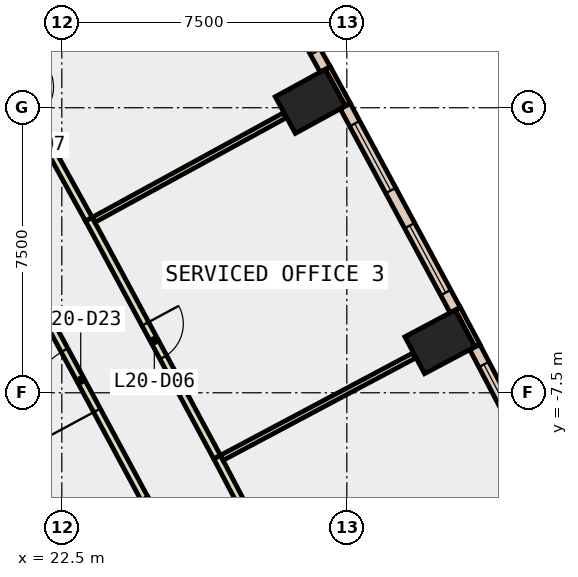
"""IFC4 building model, lengths in metres.
Left out: names, types, materials, properties, quantities, classifications, styles, units other than length and angle.
Written with IfcOpenShell. Run it as: python <this file> out.ifc"""

import sys

from ifc_helpers import new_model, si_unit, direction, frame, frame_2d, origin, origin_2d, place, context, subcontext, project, spatial, rectangle, extrude, element, fill, save


model = new_model("IFC4")
c1 = context("Model", 3, precision=1e-05, world=origin(), true_north=direction((0.0, 1.0)))
c2 = subcontext(c1, "Body", "Model", "MODEL_VIEW")
j1 = project(units=[si_unit("LENGTHUNIT", "METRE"), si_unit("PLANEANGLEUNIT", "RADIAN")], contexts=[c1])
p1 = place(None, origin())
s1 = spatial("IfcSite", under=j1, at=p1, CompositionType="ELEMENT")
p2 = place(p1, origin())
s2 = spatial("IfcBuilding", under=s1, at=p2, CompositionType="ELEMENT")
p3 = place(p2, frame((0.0, 0.0, 95.0)))
s3 = spatial("IfcBuildingStorey", under=s2, at=p3, CompositionType="ELEMENT", Elevation=95.0)
for number, where, z_axis, x_axis in (
    (1, (32.449, -6.16, -0.4), (0.0, 0.0, 1.0), (-0.469, 0.883, 0.0)),
    (2, (29.039, 0.167, -0.4), (0.0, 0.0, 1.0), (-0.48, 0.877, 0.0)),
):
    element("IfcColumn", number, at=place(p3, frame(where, z_axis=z_axis, x_axis=x_axis)), inside=s3, PredefinedType="COLUMN", context=c2, shape_type="SweptSolid", body=[
        extrude(rectangle(XDim=1.1, YDim=1.5, at=origin_2d()), origin(), (0.0, 0.0, 1.0), 4.2),
    ])
p4 = place(p3, frame((33.436, -6.259, 0.0), z_axis=(0.0, 0.0, 1.0), x_axis=(-0.469366248657, 0.883003581319, 0.0)))
e3 = element("IfcWall", 3, at=p4, inside=s3, PredefinedType="STANDARD", context=c2, shape_type="SweptSolid", body=[
    extrude(rectangle(XDim=1.1, YDim=0.15, at=frame_2d((0.55, 0.0))), origin(), (0.0, 0.0, 1.0), 3.8),
])
p5 = place(p3, frame((30.027, 0.08, 0.0), z_axis=(0.0, 0.0, 1.0), x_axis=(-0.479737645119, 0.877411985247, 0.0)))
e4 = element("IfcWall", 4, at=p5, inside=s3, PredefinedType="STANDARD", context=c2, shape_type="SweptSolid", body=[
    extrude(rectangle(XDim=1.101, YDim=0.15, at=frame_2d((0.55, 0.0))), origin(), (0.0, 0.0, 1.0), 3.8),
])
p6 = place(p3, frame((36.186, -11.676, 0.0), z_axis=(0.0, 0.0, 1.0), x_axis=(-0.464187178015, 0.885737130173, 0.0)))
e5 = element("IfcWall", 5, at=p6, inside=s3, PredefinedType="STANDARD", context=c2, shape_type="SweptSolid", body=[
    extrude(rectangle(XDim=6.075, YDim=0.3, at=frame_2d((3.038, 0.0))), origin(), (0.0, 0.0, 1.0), 3.8),
])
p7 = place(p6, frame((0.519, 0.0, 0.9)))
e6 = element("IfcOpeningElement", 6, at=p7, cuts=e5, PredefinedType="OPENING", context=c2, shape_type="SweptSolid", body=[
    extrude(rectangle(XDim=2.0, YDim=2.6, at=frame_2d((1.0, 1.3))), frame((0.0, 0.16, 0.0), z_axis=(0.0, -1.0, 0.0), x_axis=(1.0, 0.0, 0.0)), (0.0, 0.0, 1.0), 0.32),
])
p8 = place(p6, frame((3.556, 0.0, 0.9)))
e7 = element("IfcOpeningElement", 7, at=p8, cuts=e5, PredefinedType="OPENING", context=c2, shape_type="SweptSolid", body=[
    extrude(rectangle(XDim=2.0, YDim=2.6, at=frame_2d((1.0, 1.3))), frame((0.0, 0.16, 0.0), z_axis=(0.0, -1.0, 0.0), x_axis=(1.0, 0.0, 0.0)), (0.0, 0.0, 1.0), 0.32),
])
p9 = place(p3, frame((32.851, -5.325, 0.0), z_axis=(0.0, 0.0, 1.0), x_axis=(-0.474369552216, 0.880325807829, 0.0)))
e8 = element("IfcWall", 8, at=p9, inside=s3, PredefinedType="STANDARD", context=c2, shape_type="SweptSolid", body=[
    extrude(rectangle(XDim=6.099, YDim=0.3, at=frame_2d((3.049, 0.0))), origin(), (0.0, 0.0, 1.0), 3.8),
])
p10 = place(p9, frame((0.525, 0.0, 0.9)))
e9 = element("IfcOpeningElement", 9, at=p10, cuts=e8, PredefinedType="OPENING", context=c2, shape_type="SweptSolid", body=[
    extrude(rectangle(XDim=2.0, YDim=2.6, at=frame_2d((1.0, 1.3))), frame((0.0, 0.16, 0.0), z_axis=(0.0, -1.0, 0.0), x_axis=(1.0, 0.0, 0.0)), (0.0, 0.0, 1.0), 0.32),
])
p11 = place(p9, frame((3.574, 0.0, 0.9)))
e10 = element("IfcOpeningElement", 10, at=p11, cuts=e8, PredefinedType="OPENING", context=c2, shape_type="SweptSolid", body=[
    extrude(rectangle(XDim=2.0, YDim=2.6, at=frame_2d((1.0, 1.3))), frame((0.0, 0.16, 0.0), z_axis=(0.0, -1.0, 0.0), x_axis=(1.0, 0.0, 0.0)), (0.0, 0.0, 1.0), 0.32),
])
p12 = place(p3, frame((29.431, 1.007, 0.0), z_axis=(0.0, 0.0, 1.0), x_axis=(-0.484823579315, 0.874611969356, 0.0)))
e11 = element("IfcWall", 11, at=p12, inside=s3, PredefinedType="STANDARD", context=c2, shape_type="SweptSolid", body=[
    extrude(rectangle(XDim=6.099, YDim=0.3, at=frame_2d((3.049, 0.0))), origin(), (0.0, 0.0, 1.0), 3.8),
])
p13 = place(p12, frame((0.525, 0.0, 0.9)))
e12 = element("IfcOpeningElement", 12, at=p13, cuts=e11, PredefinedType="OPENING", context=c2, shape_type="SweptSolid", body=[
    extrude(rectangle(XDim=2.0, YDim=2.6, at=frame_2d((1.0, 1.3))), frame((0.0, 0.16, 0.0), z_axis=(0.0, -1.0, 0.0), x_axis=(1.0, 0.0, 0.0)), (0.0, 0.0, 1.0), 0.32),
])
p14 = place(p12, frame((3.574, 0.0, 0.9)))
e13 = element("IfcOpeningElement", 13, at=p14, cuts=e11, PredefinedType="OPENING", context=c2, shape_type="SweptSolid", body=[
    extrude(rectangle(XDim=2.0, YDim=2.6, at=frame_2d((1.0, 1.3))), frame((0.0, 0.16, 0.0), z_axis=(0.0, -1.0, 0.0), x_axis=(1.0, 0.0, 0.0)), (0.0, 0.0, 1.0), 0.32),
])
p15 = place(p3, frame((27.461, -15.6, 0.0), z_axis=(0.0, 0.0, 1.0), x_axis=(-0.464203280494, 0.885728691179, 0.0)))
e14 = element("IfcWall", 14, at=p15, inside=s3, PredefinedType="PARTITIONING", context=c2, shape_type="SweptSolid", body=[
    extrude(rectangle(XDim=5.995, YDim=0.2, at=frame_2d((2.998, 0.0))), origin(), (0.0, 0.0, 1.0), 3.8),
])
p16 = place(p3, frame((24.678, -10.29, 0.0), z_axis=(0.0, 0.0, 1.0), x_axis=(-0.474391588657, 0.880313932987, 0.0)))
e15 = element("IfcWall", 15, at=p16, inside=s3, PredefinedType="PARTITIONING", context=c2, shape_type="SweptSolid", body=[
    extrude(rectangle(XDim=7.085, YDim=0.2, at=frame_2d((3.542, 0.0))), origin(), (0.0, 0.0, 1.0), 3.8),
])
p17 = place(p16, frame((2.642, 0.0, 0.0)))
e16 = element("IfcOpeningElement", 16, at=p17, cuts=e15, PredefinedType="OPENING", context=c2, shape_type="SweptSolid", body=[
    extrude(rectangle(XDim=1.8, YDim=2.1, at=frame_2d((0.9, 1.05))), frame((0.0, 0.11, 0.0), z_axis=(0.0, -1.0, 0.0), x_axis=(1.0, 0.0, 0.0)), (0.0, 0.0, 1.0), 0.22),
])
p18 = place(p3, frame((26.586, -9.191, 0.0), z_axis=(0.0, 0.0, 1.0), x_axis=(0.46422194761, -0.885718907643, 0.0)))
e17 = element("IfcWall", 17, at=p18, inside=s3, PredefinedType="PARTITIONING", context=c2, shape_type="SweptSolid", body=[
    extrude(rectangle(XDim=6.366, YDim=0.2, at=frame_2d((3.183, 0.0))), origin(), (0.0, 0.0, 1.0), 3.8),
])
p19 = place(p18, frame((2.683, 0.0, 0.0)))
e18 = element("IfcOpeningElement", 18, at=p19, cuts=e17, PredefinedType="OPENING", context=c2, shape_type="SweptSolid", body=[
    extrude(rectangle(XDim=1.0, YDim=2.1, at=frame_2d((0.5, 1.05))), frame((0.0, 0.11, 0.0), z_axis=(0.0, -1.0, 0.0), x_axis=(1.0, 0.0, 0.0)), (0.0, 0.0, 1.0), 0.22),
])
p20 = place(p3, frame((23.212, -2.932, 0.0), z_axis=(0.0, 0.0, 1.0), x_axis=(0.474404892994, -0.880306763295, 0.0)))
e19 = element("IfcWall", 19, at=p20, inside=s3, PredefinedType="PARTITIONING", context=c2, shape_type="SweptSolid", body=[
    extrude(rectangle(XDim=7.11, YDim=0.2, at=frame_2d((3.555, 0.0))), origin(), (0.0, 0.0, 1.0), 3.8),
])
p21 = place(p20, frame((3.13, 0.0, 0.0)))
e20 = element("IfcOpeningElement", 20, at=p21, cuts=e19, PredefinedType="OPENING", context=c2, shape_type="SweptSolid", body=[
    extrude(rectangle(XDim=1.0, YDim=2.1, at=frame_2d((0.5, 1.05))), frame((0.0, 0.11, 0.0), z_axis=(0.0, -1.0, 0.0), x_axis=(1.0, 0.0, 0.0)), (0.0, 0.0, 1.0), 0.22),
])
p22 = place(p3, frame((19.764, 3.286, 0.0), z_axis=(0.0, 0.0, 1.0), x_axis=(0.484858403734, -0.874592664232, 0.0)))
e21 = element("IfcWall", 21, at=p22, inside=s3, PredefinedType="PARTITIONING", context=c2, shape_type="SweptSolid", body=[
    extrude(rectangle(XDim=7.109, YDim=0.2, at=frame_2d((3.555, 0.0))), origin(), (0.0, 0.0, 1.0), 3.8),
])
p23 = place(p22, frame((3.13, 0.0, 0.0)))
e22 = element("IfcOpeningElement", 22, at=p23, cuts=e21, PredefinedType="OPENING", context=c2, shape_type="SweptSolid", body=[
    extrude(rectangle(XDim=1.0, YDim=2.1, at=frame_2d((0.5, 1.05))), frame((0.0, 0.11, 0.0), z_axis=(0.0, -1.0, 0.0), x_axis=(1.0, 0.0, 0.0)), (0.0, 0.0, 1.0), 0.22),
])
p24 = place(p3, frame((26.709, -9.211, 0.0), z_axis=(0.0, 0.0, 1.0), x_axis=(0.883057238515, 0.46926529118, 0.0)))
e23 = element("IfcWall", 23, at=p24, inside=s3, PredefinedType="PARTITIONING", context=c2, shape_type="SweptSolid", body=[
    extrude(rectangle(XDim=5.73, YDim=0.15, at=frame_2d((2.865, 0.0))), origin(), (0.0, 0.0, 1.0), 3.8),
])
p25 = place(p3, frame((23.336, -2.95, 0.0), z_axis=(0.0, 0.0, 1.0), x_axis=(0.877455496162, 0.479658057637, 0.0)))
e24 = element("IfcWall", 24, at=p25, inside=s3, PredefinedType="PARTITIONING", context=c2, shape_type="SweptSolid", body=[
    extrude(rectangle(XDim=5.729, YDim=0.15, at=frame_2d((2.865, 0.0))), origin(), (0.0, 0.0, 1.0), 3.8),
])
p26 = place(p8, origin())
e25 = element("IfcWindow", 25, at=p26, inside=s3, PartitioningType="SINGLE_PANEL", PredefinedType="WINDOW", context=c2, shape_type="SweptSolid", body=[
    extrude(rectangle(XDim=2.0, YDim=2.6, at=frame_2d((1.0, 1.3))), frame((0.0, 0.03, 0.0), z_axis=(0.0, -1.0, 0.0), x_axis=(1.0, 0.0, 0.0)), (0.0, 0.0, 1.0), 0.06),
])
fill(e7, e25)
p27 = place(p10, origin())
e26 = element("IfcWindow", 26, at=p27, inside=s3, PartitioningType="SINGLE_PANEL", PredefinedType="WINDOW", context=c2, shape_type="SweptSolid", body=[
    extrude(rectangle(XDim=2.0, YDim=2.6, at=frame_2d((1.0, 1.3))), frame((0.0, 0.03, 0.0), z_axis=(0.0, -1.0, 0.0), x_axis=(1.0, 0.0, 0.0)), (0.0, 0.0, 1.0), 0.06),
])
fill(e9, e26)
p28 = place(p11, origin())
e27 = element("IfcWindow", 27, at=p28, inside=s3, PartitioningType="SINGLE_PANEL", PredefinedType="WINDOW", context=c2, shape_type="SweptSolid", body=[
    extrude(rectangle(XDim=2.0, YDim=2.6, at=frame_2d((1.0, 1.3))), frame((0.0, 0.03, 0.0), z_axis=(0.0, -1.0, 0.0), x_axis=(1.0, 0.0, 0.0)), (0.0, 0.0, 1.0), 0.06),
])
fill(e10, e27)
p29 = place(p13, origin())
e28 = element("IfcWindow", 28, at=p29, inside=s3, PartitioningType="SINGLE_PANEL", PredefinedType="WINDOW", context=c2, shape_type="SweptSolid", body=[
    extrude(rectangle(XDim=2.0, YDim=2.6, at=frame_2d((1.0, 1.3))), frame((0.0, 0.03, 0.0), z_axis=(0.0, -1.0, 0.0), x_axis=(1.0, 0.0, 0.0)), (0.0, 0.0, 1.0), 0.06),
])
fill(e12, e28)
p30 = place(p21, origin())
e29 = element("IfcDoor", 29, at=p30, inside=s3, OperationType="SINGLE_SWING_LEFT", PredefinedType="DOOR", context=c2, shape_type="SweptSolid", body=[
    extrude(rectangle(XDim=1.0, YDim=2.1, at=frame_2d((0.5, 1.05))), frame((0.0, 0.025, 0.0), z_axis=(0.0, -1.0, 0.0), x_axis=(1.0, 0.0, 0.0)), (0.0, 0.0, 1.0), 0.05),
])
fill(e20, e29)
p31 = place(p17, origin())
e30 = element("IfcDoor", 30, at=p31, inside=s3, OperationType="DOUBLE_DOOR_SINGLE_SWING", PredefinedType="DOOR", context=c2, shape_type="SweptSolid", body=[
    extrude(rectangle(XDim=1.8, YDim=2.1, at=frame_2d((0.9, 1.05))), frame((0.0, 0.025, 0.0), z_axis=(0.0, -1.0, 0.0), x_axis=(1.0, 0.0, 0.0)), (0.0, 0.0, 1.0), 0.05),
])
fill(e16, e30)
save(model, sys.argv[1])
